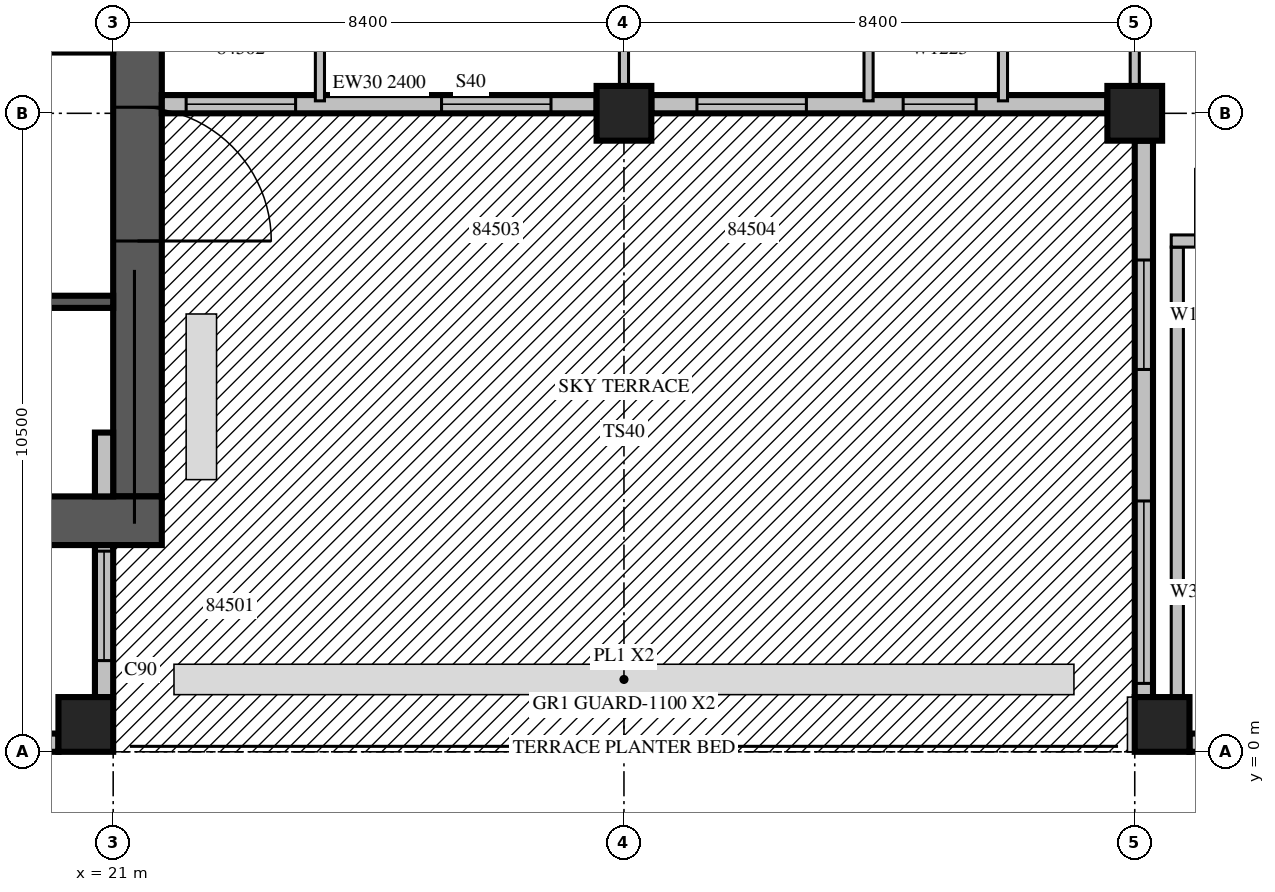
"""IFC4 building model, lengths in metres.
Left out: names, types, materials, properties, quantities, classifications, styles, units other than length and angle.
Written with IfcOpenShell. Run it as: python <this file> out.ifc"""

import sys

from ifc_helpers import new_model, si_unit, direction, frame, frame_2d, origin, origin_2d, place, context, subcontext, project, spatial, rectangle, extrude, source, transform, mapped, element, fill, save


model = new_model("IFC4")
c1 = context("Model", 3, precision=1e-05, world=origin(), true_north=direction((0.0, 1.0)))
c2 = subcontext(c1, "Body", "Model", "MODEL_VIEW")
j1 = project(units=[si_unit("LENGTHUNIT", "METRE"), si_unit("PLANEANGLEUNIT", "RADIAN")], contexts=[c1])
p1 = place(None, origin())
s1 = spatial("IfcSite", under=j1, at=p1, CompositionType="ELEMENT")
p2 = place(p1, origin())
s2 = spatial("IfcBuilding", under=s1, at=p2, CompositionType="ELEMENT")
p3 = place(p2, frame((0.0, 0.0, 204.4)))
s3 = spatial("IfcBuildingStorey", under=s2, at=p3, CompositionType="ELEMENT", Elevation=204.4)
m1 = source(origin(), c2, "Body", "SweptSolid", [
    extrude(rectangle(XDim=0.9, YDim=0.9, at=origin_2d()), origin(), (0.0, 0.0, 1.0), 3.8),
])
for number, where, z_axis, x_axis in (
    (1, (20.55, 0.45, 0.0), (0.0, 0.0, 1.0), (1.0, 0.0, 0.0)),
    (2, (38.25, 0.45, 0.0), (0.0, 0.0, 1.0), (1.0, 0.0, 0.0)),
    (3, (29.4, 10.5, 0.0), (0.0, 0.0, 1.0), (1.0, 0.0, 0.0)),
    (4, (37.8, 10.5, 0.0), (0.0, 0.0, 1.0), (1.0, 0.0, 0.0)),
):
    element("IfcColumn", number, at=place(p3, frame(where, z_axis=z_axis, x_axis=x_axis)), inside=s3, PredefinedType="COLUMN", context=c2, shape_type="MappedRepresentation", body=[
        mapped(m1, transform((0.0, 0.0, 0.0), scale=1.0)),
    ])
m2 = source(origin(), c2, "Body", "SweptSolid", [
    extrude(rectangle(XDim=16.8, YDim=0.8, at=frame_2d((8.4, 0.0))), origin(), (0.0, 0.0, 1.0), 3.8),
])
p4 = place(p3, frame((21.4, 4.2, 0.0), z_axis=(0.0, 0.0, 1.0), x_axis=(0.0, 1.0, 0.0)))
e5 = element("IfcWall", 5, at=p4, inside=s3, PredefinedType="SHEAR", context=c2, shape_type="MappedRepresentation", body=[
    mapped(m2, transform((0.0, 0.0, 0.0), scale=1.0)),
])
m3 = source(origin(), c2, "Body", "SweptSolid", [
    extrude(rectangle(XDim=2.2, YDim=2.1, at=frame_2d((1.1, 1.05))), frame((0.0, 0.41, 0.0), z_axis=(0.0, -1.0, 0.0), x_axis=(1.0, 0.0, 0.0)), (0.0, 0.0, 1.0), 0.82),
])
p5 = place(p4, frame((4.2, 0.0, 0.0)))
e6 = element("IfcOpeningElement", 6, at=p5, cuts=e5, PredefinedType="OPENING", context=c2, shape_type="MappedRepresentation", body=[
    mapped(m3, transform((0.0, 0.0, 0.0), scale=1.0)),
])
m4 = source(origin(), c2, "Body", "SweptSolid", [
    extrude(rectangle(XDim=1.2, YDim=2.1, at=frame_2d((0.6, 1.05))), frame((0.0, 0.41, 0.0), z_axis=(0.0, -1.0, 0.0), x_axis=(1.0, 0.0, 0.0)), (0.0, 0.0, 1.0), 0.82),
])
p6 = place(p4, frame((14.7, 0.0, 0.0)))
e7 = element("IfcOpeningElement", 7, at=p6, cuts=e5, PredefinedType="OPENING", context=c2, shape_type="MappedRepresentation", body=[
    mapped(m4, transform((0.0, 0.0, 0.0), scale=1.0)),
])
m5 = source(origin(), c2, "Body", "SweptSolid", [
    extrude(rectangle(XDim=17.6, YDim=0.8, at=frame_2d((8.8, 0.0))), origin(), (0.0, 0.0, 1.0), 3.8),
])
p7 = place(p3, frame((4.2, 3.8, 0.0), z_axis=(0.0, 0.0, 1.0), x_axis=(1.0, 0.0, 0.0)))
e8 = element("IfcWall", 8, at=p7, inside=s3, PredefinedType="SHEAR", context=c2, shape_type="MappedRepresentation", body=[
    mapped(m5, transform((0.0, 0.0, 0.0), scale=1.0)),
])
m6 = source(origin(), c2, "Body", "SweptSolid", [
    extrude(rectangle(XDim=0.9, YDim=2.1, at=frame_2d((0.45, 1.05))), frame((0.0, 0.41, 0.0), z_axis=(0.0, -1.0, 0.0), x_axis=(1.0, 0.0, 0.0)), (0.0, 0.0, 1.0), 0.82),
])
p8 = place(p7, frame((11.55, 0.0, 0.0)))
e9 = element("IfcOpeningElement", 9, at=p8, cuts=e8, PredefinedType="OPENING", context=c2, shape_type="MappedRepresentation", body=[
    mapped(m6, transform((0.0, 0.0, 0.0), scale=1.0)),
])
p9 = place(p3, frame((10.95, 0.15, 0.0), z_axis=(0.0, 0.0, 1.0), x_axis=(1.0, 0.0, 0.0)))
e10 = element("IfcWall", 10, at=p9, inside=s3, PredefinedType="STANDARD", context=c2, shape_type="SweptSolid", body=[
    extrude(rectangle(XDim=9.15, YDim=0.3, at=frame_2d((4.575, 0.0))), origin(), (0.0, 0.0, 1.0), 2.9),
])
m7 = source(origin(), c2, "Body", "SweptSolid", [
    extrude(rectangle(XDim=3.6, YDim=2.3, at=frame_2d((1.8, 1.15))), frame((0.0, 0.16, 0.0), z_axis=(0.0, -1.0, 0.0), x_axis=(1.0, 0.0, 0.0)), (0.0, 0.0, 1.0), 0.32),
])
p10 = place(p9, frame((0.375, 0.0, 0.6)))
e11 = element("IfcOpeningElement", 11, at=p10, cuts=e10, PredefinedType="OPENING", context=c2, shape_type="MappedRepresentation", body=[
    mapped(m7, transform((0.0, 0.0, 0.0), scale=1.0)),
])
m8 = source(origin(), c2, "Body", "SweptSolid", [
    extrude(rectangle(XDim=3.0, YDim=2.3, at=frame_2d((1.5, 1.15))), frame((0.0, 0.16, 0.0), z_axis=(0.0, -1.0, 0.0), x_axis=(1.0, 0.0, 0.0)), (0.0, 0.0, 1.0), 0.32),
])
p11 = place(p9, frame((5.925, 0.0, 0.6)))
e12 = element("IfcOpeningElement", 12, at=p11, cuts=e10, PredefinedType="OPENING", context=c2, shape_type="MappedRepresentation", body=[
    mapped(m8, transform((0.0, 0.0, 0.0), scale=1.0)),
])
m9 = source(origin(), c2, "Body", "SweptSolid", [
    extrude(rectangle(XDim=2.5, YDim=0.3, at=frame_2d((1.25, 0.0))), origin(), (0.0, 0.0, 1.0), 3.4),
])
p12 = place(p3, frame((20.85, 0.9, 0.0), z_axis=(0.0, 0.0, 1.0), x_axis=(0.0, 1.0, 0.0)))
e13 = element("IfcWall", 13, at=p12, inside=s3, PredefinedType="STANDARD", context=c2, shape_type="MappedRepresentation", body=[
    mapped(m9, transform((0.0, 0.0, 0.0), scale=1.0)),
])
m10 = source(origin(), c2, "Body", "SweptSolid", [
    extrude(rectangle(XDim=1.8, YDim=2.4, at=frame_2d((0.9, 1.2))), frame((0.0, 0.16, 0.0), z_axis=(0.0, -1.0, 0.0), x_axis=(1.0, 0.0, 0.0)), (0.0, 0.0, 1.0), 0.32),
])
p13 = place(p12, frame((0.6, 0.0, 0.0)))
e14 = element("IfcOpeningElement", 14, at=p13, cuts=e13, PredefinedType="OPENING", context=c2, shape_type="MappedRepresentation", body=[
    mapped(m10, transform((0.0, 0.0, 0.0), scale=1.0)),
])
p14 = place(p3, frame((20.85, 4.2, 0.0), z_axis=(0.0, 0.0, 1.0), x_axis=(0.0, 1.0, 0.0)))
e15 = element("IfcWall", 15, at=p14, inside=s3, PredefinedType="STANDARD", context=c2, shape_type="SweptSolid", body=[
    extrude(rectangle(XDim=1.05, YDim=0.3, at=frame_2d((0.525, 0.0))), origin(), (0.0, 0.0, 1.0), 3.4),
])
p15 = place(p3, frame((21.8, 10.65, 0.0), z_axis=(0.0, 0.0, 1.0), x_axis=(1.0, 0.0, 0.0)))
e16 = element("IfcWall", 16, at=p15, inside=s3, PredefinedType="STANDARD", context=c2, shape_type="SweptSolid", body=[
    extrude(rectangle(XDim=7.15, YDim=0.3, at=frame_2d((3.575, 0.0))), origin(), (0.0, 0.0, 1.0), 2.4),
])
p16 = place(p15, frame((0.4, 0.0, 0.0)))
e17 = element("IfcOpeningElement", 17, at=p16, cuts=e16, PredefinedType="OPENING", context=c2, shape_type="MappedRepresentation", body=[
    mapped(m10, transform((0.0, 0.0, 0.0), scale=1.0)),
])
p17 = place(p15, frame((4.6, 0.0, 0.0)))
e18 = element("IfcOpeningElement", 18, at=p17, cuts=e16, PredefinedType="OPENING", context=c2, shape_type="MappedRepresentation", body=[
    mapped(m10, transform((0.0, 0.0, 0.0), scale=1.0)),
])
m11 = source(origin(), c2, "Body", "SweptSolid", [
    extrude(rectangle(XDim=7.5, YDim=0.3, at=frame_2d((3.75, 0.0))), origin(), (0.0, 0.0, 1.0), 3.4),
])
p18 = place(p3, frame((29.85, 10.65, 0.0), z_axis=(0.0, 0.0, 1.0), x_axis=(1.0, 0.0, 0.0)))
e19 = element("IfcWall", 19, at=p18, inside=s3, PredefinedType="STANDARD", context=c2, shape_type="MappedRepresentation", body=[
    mapped(m11, transform((0.0, 0.0, 0.0), scale=1.0)),
])
p19 = place(p18, frame((0.75, 0.0, 0.0)))
e20 = element("IfcOpeningElement", 20, at=p19, cuts=e19, PredefinedType="OPENING", context=c2, shape_type="MappedRepresentation", body=[
    mapped(m10, transform((0.0, 0.0, 0.0), scale=1.0)),
])
m12 = source(origin(), c2, "Body", "SweptSolid", [
    extrude(rectangle(XDim=1.2, YDim=2.3, at=frame_2d((0.6, 1.15))), frame((0.0, 0.16, 0.0), z_axis=(0.0, -1.0, 0.0), x_axis=(1.0, 0.0, 0.0)), (0.0, 0.0, 1.0), 0.32),
])
p20 = place(p18, frame((4.141, 0.0, 0.6)))
e21 = element("IfcOpeningElement", 21, at=p20, cuts=e19, PredefinedType="OPENING", context=c2, shape_type="MappedRepresentation", body=[
    mapped(m12, transform((0.0, 0.0, 0.0), scale=1.0)),
])
m13 = source(origin(), c2, "Body", "SweptSolid", [
    extrude(rectangle(XDim=9.15, YDim=0.3, at=frame_2d((4.575, 0.0))), origin(), (0.0, 0.0, 1.0), 3.4),
])
p21 = place(p3, frame((37.95, 10.05, 0.0), z_axis=(0.0, 0.0, 1.0), x_axis=(0.0, -1.0, 0.0)))
e22 = element("IfcWall", 22, at=p21, inside=s3, PredefinedType="STANDARD", context=c2, shape_type="MappedRepresentation", body=[
    mapped(m13, transform((0.0, 0.0, 0.0), scale=1.0)),
])
m14 = source(origin(), c2, "Body", "SweptSolid", [
    extrude(rectangle(XDim=1.8, YDim=2.3, at=frame_2d((0.9, 1.15))), frame((0.0, 0.16, 0.0), z_axis=(0.0, -1.0, 0.0), x_axis=(1.0, 0.0, 0.0)), (0.0, 0.0, 1.0), 0.32),
])
p22 = place(p21, frame((1.962, 0.0, 0.6)))
e23 = element("IfcOpeningElement", 23, at=p22, cuts=e22, PredefinedType="OPENING", context=c2, shape_type="MappedRepresentation", body=[
    mapped(m14, transform((0.0, 0.0, 0.0), scale=1.0)),
])
p23 = place(p21, frame((5.925, 0.0, 0.6)))
e24 = element("IfcOpeningElement", 24, at=p23, cuts=e22, PredefinedType="OPENING", context=c2, shape_type="MappedRepresentation", body=[
    mapped(m8, transform((0.0, 0.0, 0.0), scale=1.0)),
])
p24 = place(p3, frame((38.7, 0.15, 0.0), z_axis=(0.0, 0.0, 1.0), x_axis=(1.0, 0.0, 0.0)))
e25 = element("IfcWall", 25, at=p24, inside=s3, PredefinedType="STANDARD", context=c2, shape_type="SweptSolid", body=[
    extrude(rectangle(XDim=1.5, YDim=0.3, at=frame_2d((0.75, 0.0))), origin(), (0.0, 0.0, 1.0), 3.4),
])
m15 = source(origin(), c2, "Body", "SweptSolid", [
    extrude(rectangle(XDim=2.4, YDim=0.2, at=frame_2d((1.2, 0.0))), origin(), (0.0, 0.0, 1.0), 3.8),
])
p25 = place(p3, frame((18.6, 7.4, 0.0), z_axis=(0.0, 0.0, 1.0), x_axis=(1.0, 0.0, 0.0)))
e26 = element("IfcWall", 26, at=p25, inside=s3, PredefinedType="SOLIDWALL", context=c2, shape_type="MappedRepresentation", body=[
    mapped(m15, transform((0.0, 0.0, 0.0), scale=1.0)),
])
m16 = source(origin(), c2, "Body", "SweptSolid", [
    extrude(rectangle(XDim=8.0, YDim=0.2, at=frame_2d((4.0, 0.0))), origin(), (0.0, 0.0, 1.0), 3.4),
])
p26 = place(p3, frame((38.5, 0.3, 0.0), z_axis=(0.0, 0.0, 1.0), x_axis=(0.0, 1.0, 0.0)))
e27 = element("IfcWall", 27, at=p26, inside=s3, PredefinedType="PARTITIONING", context=c2, shape_type="MappedRepresentation", body=[
    mapped(m16, transform((0.0, 0.0, 0.0), scale=1.0)),
])
m17 = source(origin(), c2, "Body", "SweptSolid", [
    extrude(rectangle(XDim=5.45, YDim=0.2, at=frame_2d((2.725, 0.0))), origin(), (0.0, 0.0, 1.0), 3.4),
])
p27 = place(p3, frame((38.4, 8.4, 0.0), z_axis=(0.0, 0.0, 1.0), x_axis=(1.0, 0.0, 0.0)))
e28 = element("IfcWall", 28, at=p27, inside=s3, PredefinedType="PARTITIONING", context=c2, shape_type="MappedRepresentation", body=[
    mapped(m17, transform((0.0, 0.0, 0.0), scale=1.0)),
])
m18 = source(origin(), c2, "Body", "SweptSolid", [
    extrude(rectangle(XDim=1.2, YDim=2.1, at=frame_2d((0.6, 1.05))), frame((0.0, 0.11, 0.0), z_axis=(0.0, -1.0, 0.0), x_axis=(1.0, 0.0, 0.0)), (0.0, 0.0, 1.0), 0.22),
])
p28 = place(p27, frame((0.4, 0.0, 0.0)))
e29 = element("IfcOpeningElement", 29, at=p28, cuts=e28, PredefinedType="OPENING", context=c2, shape_type="MappedRepresentation", body=[
    mapped(m18, transform((0.0, 0.0, 0.0), scale=1.0)),
])
m19 = source(origin(), c2, "Body", "SweptSolid", [
    extrude(rectangle(XDim=0.9, YDim=2.1, at=frame_2d((0.45, 1.05))), frame((0.0, 0.11, 0.0), z_axis=(0.0, -1.0, 0.0), x_axis=(1.0, 0.0, 0.0)), (0.0, 0.0, 1.0), 0.22),
])
p29 = place(p27, frame((3.25, 0.0, 0.0)))
e30 = element("IfcOpeningElement", 30, at=p29, cuts=e28, PredefinedType="OPENING", context=c2, shape_type="MappedRepresentation", body=[
    mapped(m19, transform((0.0, 0.0, 0.0), scale=1.0)),
])
m20 = source(origin(), c2, "Body", "SweptSolid", [
    extrude(rectangle(XDim=4.295, YDim=0.15, at=frame_2d((2.147, 0.0))), origin(), (0.0, 0.0, 1.0), 3.4),
])
p30 = place(p3, frame((24.4, 15.0, 0.0), z_axis=(0.0, 0.0, 1.0), x_axis=(0.0, -1.0, 0.0)))
e31 = element("IfcWall", 31, at=p30, inside=s3, PredefinedType="PARTITIONING", context=c2, shape_type="MappedRepresentation", body=[
    mapped(m20, transform((0.0, 0.0, 0.0), scale=1.0)),
])
m21 = source(origin(), c2, "Body", "SweptSolid", [
    extrude(rectangle(XDim=0.9, YDim=2.1, at=frame_2d((0.45, 1.05))), frame((0.0, 0.085, 0.0), z_axis=(0.0, -1.0, 0.0), x_axis=(1.0, 0.0, 0.0)), (0.0, 0.0, 1.0), 0.17),
])
p31 = place(p30, frame((1.113, 0.0, 0.0)))
e32 = element("IfcOpeningElement", 32, at=p31, cuts=e31, PredefinedType="OPENING", context=c2, shape_type="MappedRepresentation", body=[
    mapped(m21, transform((0.0, 0.0, 0.0), scale=1.0)),
])
m22 = source(origin(), c2, "Body", "SweptSolid", [
    extrude(rectangle(XDim=4.051, YDim=0.15, at=frame_2d((2.026, 0.0))), origin(), (0.0, 0.0, 1.0), 3.4),
])
p32 = place(p3, frame((29.4, 10.949, 0.0), z_axis=(0.0, 0.0, 1.0), x_axis=(0.0, 1.0, 0.0)))
e33 = element("IfcWall", 33, at=p32, inside=s3, PredefinedType="PARTITIONING", context=c2, shape_type="MappedRepresentation", body=[
    mapped(m22, transform((0.0, 0.0, 0.0), scale=1.0)),
])
p33 = place(p3, frame((33.422, 10.705, 0.0), z_axis=(0.0, 0.0, 1.0), x_axis=(0.0, 1.0, 0.0)))
e34 = element("IfcWall", 34, at=p33, inside=s3, PredefinedType="PARTITIONING", context=c2, shape_type="MappedRepresentation", body=[
    mapped(m20, transform((0.0, 0.0, 0.0), scale=1.0)),
])
p34 = place(p3, frame((35.633, 10.705, 0.0), z_axis=(0.0, 0.0, 1.0), x_axis=(0.0, 1.0, 0.0)))
e35 = element("IfcWall", 35, at=p34, inside=s3, PredefinedType="PARTITIONING", context=c2, shape_type="MappedRepresentation", body=[
    mapped(m20, transform((0.0, 0.0, 0.0), scale=1.0)),
])
p35 = place(p34, frame((1.698, 0.0, 0.0)))
e36 = element("IfcOpeningElement", 36, at=p35, cuts=e35, PredefinedType="OPENING", context=c2, shape_type="MappedRepresentation", body=[
    mapped(m21, transform((0.0, 0.0, 0.0), scale=1.0)),
])
p36 = place(p3, frame((37.8, 10.949, 0.0), z_axis=(0.0, 0.0, 1.0), x_axis=(0.0, 1.0, 0.0)))
e37 = element("IfcWall", 37, at=p36, inside=s3, PredefinedType="PARTITIONING", context=c2, shape_type="MappedRepresentation", body=[
    mapped(m22, transform((0.0, 0.0, 0.0), scale=1.0)),
])
m23 = source(origin(), c2, "Body", "SweptSolid", [
    extrude(rectangle(XDim=1.8, YDim=2.4, at=frame_2d((0.9, 1.2))), frame((0.0, 0.025, 0.0), z_axis=(0.0, -1.0, 0.0), x_axis=(1.0, 0.0, 0.0)), (0.0, 0.0, 1.0), 0.05),
])
p37 = place(p13, origin())
e38 = element("IfcDoor", 38, at=p37, inside=s3, OperationType="SLIDING_TO_LEFT", PredefinedType="DOOR", context=c2, shape_type="MappedRepresentation", body=[
    mapped(m23, transform((0.0, 0.0, 0.0), scale=1.0)),
])
fill(e14, e38)
p38 = place(p16, origin())
e39 = element("IfcDoor", 39, at=p38, inside=s3, OperationType="SLIDING_TO_LEFT", PredefinedType="DOOR", context=c2, shape_type="MappedRepresentation", body=[
    mapped(m23, transform((0.0, 0.0, 0.0), scale=1.0)),
])
fill(e17, e39)
p39 = place(p17, origin())
e40 = element("IfcDoor", 40, at=p39, inside=s3, OperationType="SLIDING_TO_LEFT", PredefinedType="DOOR", context=c2, shape_type="MappedRepresentation", body=[
    mapped(m23, transform((0.0, 0.0, 0.0), scale=1.0)),
])
fill(e18, e40)
p40 = place(p19, origin())
e41 = element("IfcDoor", 41, at=p40, inside=s3, OperationType="SLIDING_TO_LEFT", PredefinedType="DOOR", context=c2, shape_type="MappedRepresentation", body=[
    mapped(m23, transform((0.0, 0.0, 0.0), scale=1.0)),
])
fill(e20, e41)
m24 = source(origin(), c2, "Body", "SweptSolid", [
    extrude(rectangle(XDim=1.2, YDim=2.3, at=frame_2d((0.6, 1.15))), frame((0.0, 0.03, 0.0), z_axis=(0.0, -1.0, 0.0), x_axis=(1.0, 0.0, 0.0)), (0.0, 0.0, 1.0), 0.06),
])
p41 = place(p20, origin())
e42 = element("IfcWindow", 42, at=p41, inside=s3, PartitioningType="SINGLE_PANEL", PredefinedType="WINDOW", context=c2, shape_type="MappedRepresentation", body=[
    mapped(m24, transform((0.0, 0.0, 0.0), scale=1.0)),
])
fill(e21, e42)
m25 = source(origin(), c2, "Body", "SweptSolid", [
    extrude(rectangle(XDim=1.8, YDim=2.3, at=frame_2d((0.9, 1.15))), frame((0.0, 0.03, 0.0), z_axis=(0.0, -1.0, 0.0), x_axis=(1.0, 0.0, 0.0)), (0.0, 0.0, 1.0), 0.06),
])
p42 = place(p22, origin())
e43 = element("IfcWindow", 43, at=p42, inside=s3, PartitioningType="SINGLE_PANEL", PredefinedType="WINDOW", context=c2, shape_type="MappedRepresentation", body=[
    mapped(m25, transform((0.0, 0.0, 0.0), scale=1.0)),
])
fill(e23, e43)
m26 = source(origin(), c2, "Body", "SweptSolid", [
    extrude(rectangle(XDim=3.0, YDim=2.3, at=frame_2d((1.5, 1.15))), frame((0.0, 0.03, 0.0), z_axis=(0.0, -1.0, 0.0), x_axis=(1.0, 0.0, 0.0)), (0.0, 0.0, 1.0), 0.06),
])
p43 = place(p23, origin())
e44 = element("IfcWindow", 44, at=p43, inside=s3, PartitioningType="SINGLE_PANEL", PredefinedType="WINDOW", context=c2, shape_type="MappedRepresentation", body=[
    mapped(m26, transform((0.0, 0.0, 0.0), scale=1.0)),
])
fill(e24, e44)
m27 = source(origin(), c2, "Body", "SweptSolid", [
    extrude(rectangle(XDim=2.2, YDim=2.1, at=frame_2d((1.1, 1.05))), frame((0.0, 0.025, 0.0), z_axis=(0.0, -1.0, 0.0), x_axis=(1.0, 0.0, 0.0)), (0.0, 0.0, 1.0), 0.05),
])
p44 = place(p5, origin())
e45 = element("IfcDoor", 45, at=p44, inside=s3, OperationType="DOUBLE_DOOR_SINGLE_SWING", PredefinedType="DOOR", context=c2, shape_type="MappedRepresentation", body=[
    mapped(m27, transform((0.0, 0.0, 0.0), scale=1.0)),
])
fill(e6, e45)
save(model, sys.argv[1])
